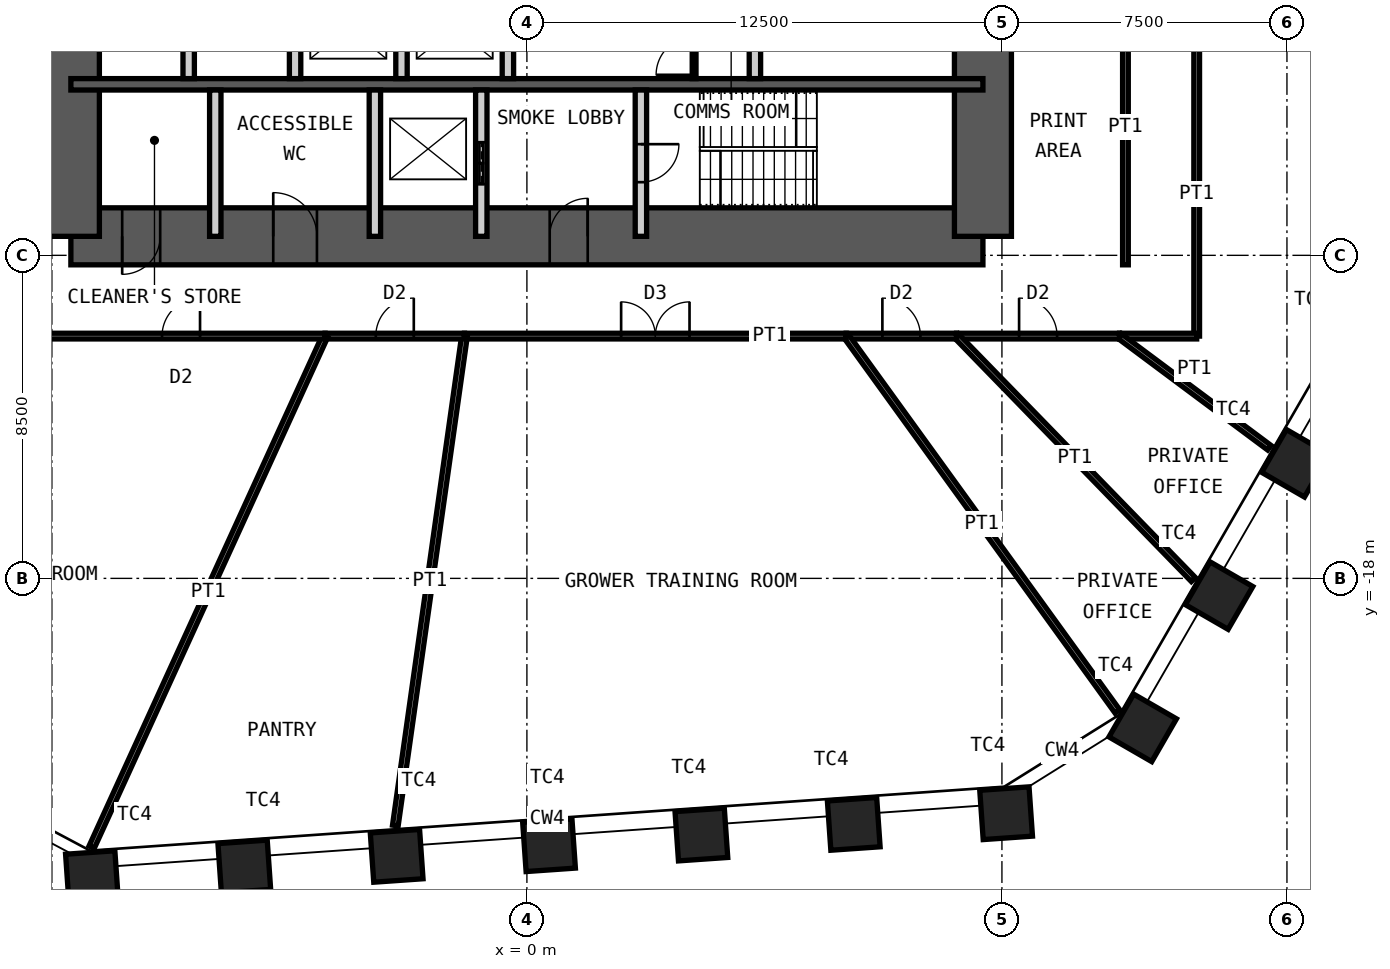
"""IFC4 building model, lengths in metres.
Left out: names, types, materials, properties, quantities, classifications, styles, units other than length and angle.
Written with IfcOpenShell. Run it as: python <this file> out.ifc"""

import sys

from ifc_helpers import new_model, si_unit, direction, frame, frame_2d, origin, origin_2d, place, context, subcontext, project, spatial, rectangle, hollow_rectangle, extrude, element, fill, save


model = new_model("IFC4")
c1 = context("Model", 3, precision=1e-05, world=origin(), true_north=direction((0.0, 1.0)))
c2 = subcontext(c1, "Body", "Model", "MODEL_VIEW")
j1 = project(units=[si_unit("LENGTHUNIT", "METRE"), si_unit("PLANEANGLEUNIT", "RADIAN")], contexts=[c1])
p1 = place(None, origin())
s1 = spatial("IfcSite", under=j1, at=p1, CompositionType="ELEMENT")
p2 = place(p1, origin())
s2 = spatial("IfcBuilding", under=s1, at=p2, CompositionType="ELEMENT")
p3 = place(p2, frame((0.0, 0.0, 161.8)))
s3 = spatial("IfcBuildingStorey", under=s2, at=p3, CompositionType="ELEMENT", Elevation=161.8)
for number, where, z_axis, x_axis in (
    (1, (20.223, -14.972, 0.0), (0.0, 0.0, 1.0), (0.5, 0.866, 0.0)),
    (2, (18.214, -18.453, 0.0), (0.0, 0.0, 1.0), (0.5, 0.866, 0.0)),
    (3, (16.204, -21.933, 0.0), (0.0, 0.0, 1.0), (0.5, 0.866, 0.0)),
    (4, (12.61, -24.179, 0.0), (0.0, 0.0, 1.0), (0.998, 0.07, 0.0)),
    (5, (8.601, -24.46, 0.0), (0.0, 0.0, 1.0), (0.998, 0.07, 0.0)),
    (6, (4.592, -24.74, 0.0), (0.0, 0.0, 1.0), (0.998, 0.07, 0.0)),
    (7, (0.582, -25.02, 0.0), (0.0, 0.0, 1.0), (0.998, 0.07, 0.0)),
    (8, (-3.427, -25.301, 0.0), (0.0, 0.0, 1.0), (0.998, 0.07, 0.0)),
    (9, (-7.436, -25.581, 0.0), (0.0, 0.0, 1.0), (0.998, 0.07, 0.0)),
    (10, (-11.446, -25.861, 0.0), (0.0, 0.0, 1.0), (0.998, 0.07, 0.0)),
):
    element("IfcColumn", number, at=place(p3, frame(where, z_axis=z_axis, x_axis=x_axis)), inside=s3, PredefinedType="COLUMN", context=c2, shape_type="SweptSolid", body=[
        extrude(hollow_rectangle(XDim=1.3, YDim=1.3, WallThickness=0.1, at=origin_2d()), origin(), (0.0, 0.0, 1.0), 4.2),
    ])
p4 = place(p3, frame((-12.0, -9.0, 0.0), z_axis=(0.0, 0.0, 1.0), x_axis=(1.0, 0.0, 0.0)))
e11 = element("IfcWall", 11, at=p4, inside=s3, PredefinedType="SHEAR", context=c2, shape_type="SweptSolid", body=[
    extrude(rectangle(XDim=24.0, YDim=1.5, at=frame_2d((12.0, 0.0))), origin(), (0.0, 0.0, 1.0), 4.2),
])
p5 = place(p4, frame((1.35, 0.0, 0.0)))
e12 = element("IfcOpeningElement", 12, at=p5, cuts=e11, PredefinedType="OPENING", context=c2, shape_type="SweptSolid", body=[
    extrude(rectangle(XDim=1.0, YDim=2.1, at=frame_2d((0.5, 1.05))), frame((0.0, 0.76, 0.0), z_axis=(0.0, -1.0, 0.0), x_axis=(1.0, 0.0, 0.0)), (0.0, 0.0, 1.0), 1.52),
])
p6 = place(p4, frame((5.325, 0.0, 0.0)))
e13 = element("IfcOpeningElement", 13, at=p6, cuts=e11, PredefinedType="OPENING", context=c2, shape_type="SweptSolid", body=[
    extrude(rectangle(XDim=1.15, YDim=2.1, at=frame_2d((0.575, 1.05))), frame((0.0, 0.76, 0.0), z_axis=(0.0, -1.0, 0.0), x_axis=(1.0, 0.0, 0.0)), (0.0, 0.0, 1.0), 1.52),
])
p7 = place(p4, frame((12.6, 0.0, 0.0)))
e14 = element("IfcOpeningElement", 14, at=p7, cuts=e11, PredefinedType="OPENING", context=c2, shape_type="SweptSolid", body=[
    extrude(rectangle(XDim=1.0, YDim=2.1, at=frame_2d((0.5, 1.05))), frame((0.0, 0.76, 0.0), z_axis=(0.0, -1.0, 0.0), x_axis=(1.0, 0.0, 0.0)), (0.0, 0.0, 1.0), 1.52),
])
p8 = place(p3, frame((12.0, -9.0, 0.0), z_axis=(0.0, 0.0, 1.0), x_axis=(0.0, 1.0, 0.0)))
e15 = element("IfcWall", 15, at=p8, inside=s3, PredefinedType="SHEAR", context=c2, shape_type="SweptSolid", body=[
    extrude(rectangle(XDim=18.0, YDim=1.5, at=frame_2d((9.0, 0.0))), origin(), (0.0, 0.0, 1.0), 4.2),
])
p9 = place(p8, frame((8.1, 0.0, 0.0)))
e16 = element("IfcOpeningElement", 16, at=p9, cuts=e15, PredefinedType="OPENING", context=c2, shape_type="SweptSolid", body=[
    extrude(rectangle(XDim=1.8, YDim=2.1, at=frame_2d((0.9, 1.05))), frame((0.0, 0.76, 0.0), z_axis=(0.0, -1.0, 0.0), x_axis=(1.0, 0.0, 0.0)), (0.0, 0.0, 1.0), 1.52),
])
p10 = place(p3, frame((-12.0, -9.0, 0.0), z_axis=(0.0, 0.0, 1.0), x_axis=(0.0, 1.0, 0.0)))
e17 = element("IfcWall", 17, at=p10, inside=s3, PredefinedType="SHEAR", context=c2, shape_type="SweptSolid", body=[
    extrude(rectangle(XDim=18.0, YDim=1.5, at=frame_2d((9.0, 0.0))), origin(), (0.0, 0.0, 1.0), 4.2),
])
p11 = place(p10, frame((8.1, 0.0, 0.0)))
e18 = element("IfcOpeningElement", 18, at=p11, cuts=e17, PredefinedType="OPENING", context=c2, shape_type="SweptSolid", body=[
    extrude(rectangle(XDim=1.8, YDim=2.1, at=frame_2d((0.9, 1.05))), frame((0.0, 0.76, 0.0), z_axis=(0.0, -1.0, 0.0), x_axis=(1.0, 0.0, 0.0)), (0.0, 0.0, 1.0), 1.52),
])
p12 = place(p3, frame((-12.0, -5.0, 0.0), z_axis=(0.0, 0.0, 1.0), x_axis=(1.0, 0.0, 0.0)))
e19 = element("IfcWall", 19, at=p12, inside=s3, PredefinedType="SHEAR", context=c2, shape_type="SweptSolid", body=[
    extrude(rectangle(XDim=24.0, YDim=0.3, at=frame_2d((12.0, 0.0))), origin(), (0.0, 0.0, 1.0), 4.2),
])
for number, where, z_axis, x_axis in (
    (20, (-8.9, -4.85, 0.0), (0.0, 0.0, 1.0), (0.0, 1.0, 0.0)),
    (21, (-6.1, -4.85, 0.0), (0.0, 0.0, 1.0), (0.0, 1.0, 0.0)),
    (22, (-3.3, -4.85, 0.0), (0.0, 0.0, 1.0), (0.0, 1.0, 0.0)),
    (23, (-0.5, -4.85, 0.0), (0.0, 0.0, 1.0), (0.0, 1.0, 0.0)),
    (24, (6.0, -4.85, 0.0), (0.0, 0.0, 1.0), (0.0, 1.0, 0.0)),
):
    element("IfcWall", number, at=place(p3, frame(where, z_axis=z_axis, x_axis=x_axis)), inside=s3, PredefinedType="PARTITIONING", context=c2, shape_type="SweptSolid", body=[
        extrude(rectangle(XDim=2.65, YDim=0.3, at=frame_2d((1.325, 0.0))), origin(), (0.0, 0.0, 1.0), 3.98),
    ])
for number, where, z_axis, x_axis in (
    (25, (-8.2, -9.0, 0.0), (0.0, 0.0, 1.0), (0.0, 1.0, 0.0)),
    (26, (-4.0, -9.0, 0.0), (0.0, 0.0, 1.0), (0.0, 1.0, 0.0)),
):
    element("IfcWall", number, at=place(p3, frame(where, z_axis=z_axis, x_axis=x_axis)), inside=s3, PredefinedType="PARTITIONING", context=c2, shape_type="SweptSolid", body=[
        extrude(rectangle(XDim=3.85, YDim=0.3, at=frame_2d((1.925, 0.0))), origin(), (0.0, 0.0, 1.0), 3.98),
    ])
p13 = place(p3, frame((-1.2, -9.0, 0.0), z_axis=(0.0, 0.0, 1.0), x_axis=(0.0, 1.0, 0.0)))
e27 = element("IfcWall", 27, at=p13, inside=s3, PredefinedType="PARTITIONING", context=c2, shape_type="SweptSolid", body=[
    extrude(rectangle(XDim=3.85, YDim=0.3, at=frame_2d((1.925, 0.0))), origin(), (0.0, 0.0, 1.0), 3.98),
])
p14 = place(p13, frame((1.375, 0.0, 0.0)))
e28 = element("IfcOpeningElement", 28, at=p14, cuts=e27, PredefinedType="OPENING", context=c2, shape_type="SweptSolid", body=[
    extrude(rectangle(XDim=1.1, YDim=2.4, at=frame_2d((0.55, 1.2))), frame((0.0, 0.16, 0.0), z_axis=(0.0, -1.0, 0.0), x_axis=(1.0, 0.0, 0.0)), (0.0, 0.0, 1.0), 0.32),
])
p15 = place(p3, frame((3.0, -9.0, 0.0), z_axis=(0.0, 0.0, 1.0), x_axis=(0.0, 1.0, 0.0)))
e29 = element("IfcWall", 29, at=p15, inside=s3, PredefinedType="PARTITIONING", context=c2, shape_type="SweptSolid", body=[
    extrude(rectangle(XDim=3.85, YDim=0.3, at=frame_2d((1.925, 0.0))), origin(), (0.0, 0.0, 1.0), 3.98),
])
p16 = place(p15, frame((1.425, 0.0, 0.0)))
e30 = element("IfcOpeningElement", 30, at=p16, cuts=e29, PredefinedType="OPENING", context=c2, shape_type="SweptSolid", body=[
    extrude(rectangle(XDim=1.0, YDim=2.1, at=frame_2d((0.5, 1.05))), frame((0.0, 0.16, 0.0), z_axis=(0.0, -1.0, 0.0), x_axis=(1.0, 0.0, 0.0)), (0.0, 0.0, 1.0), 0.32),
])
p17 = place(p3, frame((4.4, -4.85, 0.0), z_axis=(0.0, 0.0, 1.0), x_axis=(0.0, 1.0, 0.0)))
e31 = element("IfcWall", 31, at=p17, inside=s3, PredefinedType="PARTITIONING", context=c2, shape_type="SweptSolid", body=[
    extrude(rectangle(XDim=2.65, YDim=0.1, at=frame_2d((1.325, 0.0))), origin(), (0.0, 0.0, 1.0), 3.98),
])
p18 = place(p17, frame((0.1, 0.0, 0.0)))
e32 = element("IfcOpeningElement", 32, at=p18, cuts=e31, PredefinedType="OPENING", context=c2, shape_type="SweptSolid", body=[
    extrude(rectangle(XDim=1.0, YDim=2.4, at=frame_2d((0.5, 1.2))), frame((0.0, 0.06, 0.0), z_axis=(0.0, -1.0, 0.0), x_axis=(1.0, 0.0, 0.0)), (0.0, 0.0, 1.0), 0.12),
])
p19 = place(p3, frame((17.625, 7.106, 0.0), z_axis=(0.0, 0.0, 1.0), x_axis=(0.0, -1.0, 0.0)))
e33 = element("IfcWall", 33, at=p19, inside=s3, PredefinedType="PARTITIONING", context=c2, shape_type="SweptSolid", body=[
    extrude(rectangle(XDim=18.731, YDim=0.15, at=frame_2d((9.365, 0.0))), origin(), (0.0, 0.0, 1.0), 4.03),
])
p20 = place(p19, frame((8.466, 0.0, 0.0)))
e34 = element("IfcOpeningElement", 34, at=p20, cuts=e33, PredefinedType="OPENING", context=c2, shape_type="SweptSolid", body=[
    extrude(rectangle(XDim=1.8, YDim=2.4, at=frame_2d((0.9, 1.2))), frame((0.0, 0.085, 0.0), z_axis=(0.0, -1.0, 0.0), x_axis=(1.0, 0.0, 0.0)), (0.0, 0.0, 1.0), 0.17),
])
p21 = place(p3, frame((17.625, -11.625, 0.0), z_axis=(0.0, 0.0, 1.0), x_axis=(-1.0, 0.0, 0.0)))
e35 = element("IfcWall", 35, at=p21, inside=s3, PredefinedType="PARTITIONING", context=c2, shape_type="SweptSolid", body=[
    extrude(rectangle(XDim=2.029, YDim=0.15, at=frame_2d((1.014, 0.0))), origin(), (0.0, 0.0, 1.0), 4.03),
])
p22 = place(p3, frame((19.537, -14.562, 0.0), z_axis=(0.0, 0.0, 1.0), x_axis=(-0.801778753003, 0.597620976233, 0.0)))
e36 = element("IfcWall", 36, at=p22, inside=s3, PredefinedType="PARTITIONING", context=c2, shape_type="SweptSolid", body=[
    extrude(rectangle(XDim=4.915, YDim=0.15, at=frame_2d((2.458, 0.0))), origin(), (0.0, 0.0, 1.0), 3.28),
])
p23 = place(p3, frame((15.596, -11.625, 0.0), z_axis=(0.0, 0.0, 1.0), x_axis=(-1.0, 0.0, 0.0)))
e37 = element("IfcWall", 37, at=p23, inside=s3, PredefinedType="PARTITIONING", context=c2, shape_type="SweptSolid", body=[
    extrude(rectangle(XDim=4.289, YDim=0.15, at=frame_2d((2.145, 0.0))), origin(), (0.0, 0.0, 1.0), 4.03),
])
p24 = place(p23, frame((1.645, 0.0, 0.0)))
e38 = element("IfcOpeningElement", 38, at=p24, cuts=e37, PredefinedType="OPENING", context=c2, shape_type="SweptSolid", body=[
    extrude(rectangle(XDim=1.0, YDim=2.4, at=frame_2d((0.5, 1.2))), frame((0.0, 0.085, 0.0), z_axis=(0.0, -1.0, 0.0), x_axis=(1.0, 0.0, 0.0)), (0.0, 0.0, 1.0), 0.17),
])
p25 = place(p3, frame((17.538, -18.031, 0.0), z_axis=(0.0, 0.0, 1.0), x_axis=(-0.697230918085, 0.716846599257, 0.0)))
e39 = element("IfcWall", 39, at=p25, inside=s3, PredefinedType="PARTITIONING", context=c2, shape_type="SweptSolid", body=[
    extrude(rectangle(XDim=8.936, YDim=0.15, at=frame_2d((4.468, 0.0))), origin(), (0.0, 0.0, 1.0), 3.28),
])
p26 = place(p3, frame((11.307, -11.625, 0.0), z_axis=(0.0, 0.0, 1.0), x_axis=(-1.0, 0.0, 0.0)))
e40 = element("IfcWall", 40, at=p26, inside=s3, PredefinedType="PARTITIONING", context=c2, shape_type="SweptSolid", body=[
    extrude(rectangle(XDim=2.906, YDim=0.15, at=frame_2d((1.453, 0.0))), origin(), (0.0, 0.0, 1.0), 4.03),
])
p27 = place(p26, frame((0.953, 0.0, 0.0)))
e41 = element("IfcOpeningElement", 41, at=p27, cuts=e40, PredefinedType="OPENING", context=c2, shape_type="SweptSolid", body=[
    extrude(rectangle(XDim=1.0, YDim=2.4, at=frame_2d((0.5, 1.2))), frame((0.0, 0.085, 0.0), z_axis=(0.0, -1.0, 0.0), x_axis=(1.0, 0.0, 0.0)), (0.0, 0.0, 1.0), 0.17),
])
p28 = place(p3, frame((15.54, -21.502, 0.0), z_axis=(0.0, 0.0, 1.0), x_axis=(-0.585731902034, 0.810504866697, 0.0)))
e42 = element("IfcWall", 42, at=p28, inside=s3, PredefinedType="PARTITIONING", context=c2, shape_type="SweptSolid", body=[
    extrude(rectangle(XDim=12.187, YDim=0.15, at=frame_2d((6.093, 0.0))), origin(), (0.0, 0.0, 1.0), 2.93),
])
p29 = place(p3, frame((8.401, -11.625, 0.0), z_axis=(0.0, 0.0, 1.0), x_axis=(-1.0, 0.0, 0.0)))
e43 = element("IfcWall", 43, at=p29, inside=s3, PredefinedType="PARTITIONING", context=c2, shape_type="SweptSolid", body=[
    extrude(rectangle(XDim=10.044, YDim=0.15, at=frame_2d((5.022, 0.0))), origin(), (0.0, 0.0, 1.0), 4.03),
])
p30 = place(p29, frame((4.122, 0.0, 0.0)))
e44 = element("IfcOpeningElement", 44, at=p30, cuts=e43, PredefinedType="OPENING", context=c2, shape_type="SweptSolid", body=[
    extrude(rectangle(XDim=1.8, YDim=2.4, at=frame_2d((0.9, 1.2))), frame((0.0, 0.085, 0.0), z_axis=(0.0, -1.0, 0.0), x_axis=(1.0, 0.0, 0.0)), (0.0, 0.0, 1.0), 0.17),
])
p31 = place(p3, frame((-3.462, -24.503, 0.0), z_axis=(0.0, 0.0, 1.0), x_axis=(0.139899618934, 0.990165691499, 0.0)))
e45 = element("IfcWall", 45, at=p31, inside=s3, PredefinedType="PARTITIONING", context=c2, shape_type="SweptSolid", body=[
    extrude(rectangle(XDim=13.006, YDim=0.15, at=frame_2d((6.503, 0.0))), origin(), (0.0, 0.0, 1.0), 3.28),
])
p32 = place(p3, frame((-1.642, -11.625, 0.0), z_axis=(0.0, 0.0, 1.0), x_axis=(-1.0, 0.0, 0.0)))
e46 = element("IfcWall", 46, at=p32, inside=s3, PredefinedType="PARTITIONING", context=c2, shape_type="SweptSolid", body=[
    extrude(rectangle(XDim=3.668, YDim=0.15, at=frame_2d((1.834, 0.0))), origin(), (0.0, 0.0, 1.0), 4.03),
])
p33 = place(p32, frame((1.334, 0.0, 0.0)))
e47 = element("IfcOpeningElement", 47, at=p33, cuts=e46, PredefinedType="OPENING", context=c2, shape_type="SweptSolid", body=[
    extrude(rectangle(XDim=1.0, YDim=2.4, at=frame_2d((0.5, 1.2))), frame((0.0, 0.085, 0.0), z_axis=(0.0, -1.0, 0.0), x_axis=(1.0, 0.0, 0.0)), (0.0, 0.0, 1.0), 0.17),
])
p34 = place(p3, frame((-11.453, -25.072, 0.0), z_axis=(0.0, 0.0, 1.0), x_axis=(0.415494357555, 0.909595755729, 0.0)))
e48 = element("IfcWall", 48, at=p34, inside=s3, PredefinedType="PARTITIONING", context=c2, shape_type="SweptSolid", body=[
    extrude(rectangle(XDim=14.784, YDim=0.15, at=frame_2d((7.392, 0.0))), origin(), (0.0, 0.0, 1.0), 2.93),
])
p35 = place(p3, frame((-5.31, -11.625, 0.0), z_axis=(0.0, 0.0, 1.0), x_axis=(-1.0, 0.0, 0.0)))
e49 = element("IfcWall", 49, at=p35, inside=s3, PredefinedType="PARTITIONING", context=c2, shape_type="SweptSolid", body=[
    extrude(rectangle(XDim=7.582, YDim=0.15, at=frame_2d((3.791, 0.0))), origin(), (0.0, 0.0, 1.0), 4.03),
])
p36 = place(p35, frame((3.291, 0.0, 0.0)))
e50 = element("IfcOpeningElement", 50, at=p36, cuts=e49, PredefinedType="OPENING", context=c2, shape_type="SweptSolid", body=[
    extrude(rectangle(XDim=1.0, YDim=2.4, at=frame_2d((0.5, 1.2))), frame((0.0, 0.085, 0.0), z_axis=(0.0, -1.0, 0.0), x_axis=(1.0, 0.0, 0.0)), (0.0, 0.0, 1.0), 0.17),
])
p37 = place(p3, frame((15.75, -9.75, 0.0), z_axis=(0.0, 0.0, 1.0), x_axis=(0.0, 1.0, 0.0)))
e51 = element("IfcWall", 51, at=p37, inside=s3, PredefinedType="PARTITIONING", context=c2, shape_type="SweptSolid", body=[
    extrude(rectangle(XDim=7.25, YDim=0.15, at=frame_2d((3.625, 0.0))), origin(), (0.0, 0.0, 1.0), 4.03),
])
p38 = place(p5, origin())
e52 = element("IfcDoor", 52, at=p38, inside=s3, OperationType="SINGLE_SWING_LEFT", PredefinedType="DOOR", context=c2, shape_type="SweptSolid", body=[
    extrude(rectangle(XDim=1.0, YDim=2.1, at=frame_2d((0.5, 1.05))), frame((0.0, 0.025, 0.0), z_axis=(0.0, -1.0, 0.0), x_axis=(1.0, 0.0, 0.0)), (0.0, 0.0, 1.0), 0.05),
])
fill(e12, e52)
p39 = place(p6, origin())
e53 = element("IfcDoor", 53, at=p39, inside=s3, OperationType="SINGLE_SWING_RIGHT", PredefinedType="DOOR", context=c2, shape_type="SweptSolid", body=[
    extrude(rectangle(XDim=1.15, YDim=2.1, at=frame_2d((0.575, 1.05))), frame((0.0, 0.025, 0.0), z_axis=(0.0, -1.0, 0.0), x_axis=(1.0, 0.0, 0.0)), (0.0, 0.0, 1.0), 0.05),
])
fill(e13, e53)
p40 = place(p7, origin())
e54 = element("IfcDoor", 54, at=p40, inside=s3, OperationType="SINGLE_SWING_LEFT", PredefinedType="DOOR", context=c2, shape_type="SweptSolid", body=[
    extrude(rectangle(XDim=1.0, YDim=2.1, at=frame_2d((0.5, 1.05))), frame((0.0, 0.025, 0.0), z_axis=(0.0, -1.0, 0.0), x_axis=(1.0, 0.0, 0.0)), (0.0, 0.0, 1.0), 0.05),
])
fill(e14, e54)
p41 = place(p16, origin())
e55 = element("IfcDoor", 55, at=p41, inside=s3, OperationType="SINGLE_SWING_RIGHT", PredefinedType="DOOR", context=c2, shape_type="SweptSolid", body=[
    extrude(rectangle(XDim=1.0, YDim=2.1, at=frame_2d((0.5, 1.05))), frame((0.0, 0.025, 0.0), z_axis=(0.0, -1.0, 0.0), x_axis=(1.0, 0.0, 0.0)), (0.0, 0.0, 1.0), 0.05),
])
fill(e30, e55)
p42 = place(p14, origin())
e56 = element("IfcDoor", 56, at=p42, inside=s3, OperationType="DOUBLE_DOOR_SLIDING", PredefinedType="DOOR", context=c2, shape_type="SweptSolid", body=[
    extrude(rectangle(XDim=1.1, YDim=2.4, at=frame_2d((0.55, 1.2))), frame((0.0, 0.025, 0.0), z_axis=(0.0, -1.0, 0.0), x_axis=(1.0, 0.0, 0.0)), (0.0, 0.0, 1.0), 0.05),
])
fill(e28, e56)
p43 = place(p18, origin())
e57 = element("IfcDoor", 57, at=p43, inside=s3, OperationType="SINGLE_SWING_RIGHT", PredefinedType="DOOR", context=c2, shape_type="SweptSolid", body=[
    extrude(rectangle(XDim=1.0, YDim=2.4, at=frame_2d((0.5, 1.2))), frame((0.0, 0.025, 0.0), z_axis=(0.0, -1.0, 0.0), x_axis=(1.0, 0.0, 0.0)), (0.0, 0.0, 1.0), 0.05),
])
fill(e32, e57)
p44 = place(p24, origin())
e58 = element("IfcDoor", 58, at=p44, inside=s3, OperationType="SINGLE_SWING_RIGHT", PredefinedType="DOOR", context=c2, shape_type="SweptSolid", body=[
    extrude(rectangle(XDim=1.0, YDim=2.4, at=frame_2d((0.5, 1.2))), frame((0.0, 0.025, 0.0), z_axis=(0.0, -1.0, 0.0), x_axis=(1.0, 0.0, 0.0)), (0.0, 0.0, 1.0), 0.05),
])
fill(e38, e58)
p45 = place(p27, origin())
e59 = element("IfcDoor", 59, at=p45, inside=s3, OperationType="SINGLE_SWING_RIGHT", PredefinedType="DOOR", context=c2, shape_type="SweptSolid", body=[
    extrude(rectangle(XDim=1.0, YDim=2.4, at=frame_2d((0.5, 1.2))), frame((0.0, 0.025, 0.0), z_axis=(0.0, -1.0, 0.0), x_axis=(1.0, 0.0, 0.0)), (0.0, 0.0, 1.0), 0.05),
])
fill(e41, e59)
p46 = place(p30, origin())
e60 = element("IfcDoor", 60, at=p46, inside=s3, OperationType="DOUBLE_DOOR_DOUBLE_SWING", PredefinedType="DOOR", context=c2, shape_type="SweptSolid", body=[
    extrude(rectangle(XDim=1.8, YDim=2.4, at=frame_2d((0.9, 1.2))), frame((0.0, 0.025, 0.0), z_axis=(0.0, -1.0, 0.0), x_axis=(1.0, 0.0, 0.0)), (0.0, 0.0, 1.0), 0.05),
])
fill(e44, e60)
p47 = place(p33, origin())
e61 = element("IfcDoor", 61, at=p47, inside=s3, OperationType="SINGLE_SWING_LEFT", PredefinedType="DOOR", context=c2, shape_type="SweptSolid", body=[
    extrude(rectangle(XDim=1.0, YDim=2.4, at=frame_2d((0.5, 1.2))), frame((0.0, 0.025, 0.0), z_axis=(0.0, -1.0, 0.0), x_axis=(1.0, 0.0, 0.0)), (0.0, 0.0, 1.0), 0.05),
])
fill(e47, e61)
p48 = place(p36, origin())
e62 = element("IfcDoor", 62, at=p48, inside=s3, OperationType="SINGLE_SWING_LEFT", PredefinedType="DOOR", context=c2, shape_type="SweptSolid", body=[
    extrude(rectangle(XDim=1.0, YDim=2.4, at=frame_2d((0.5, 1.2))), frame((0.0, 0.025, 0.0), z_axis=(0.0, -1.0, 0.0), x_axis=(1.0, 0.0, 0.0)), (0.0, 0.0, 1.0), 0.05),
])
fill(e50, e62)
save(model, sys.argv[1])
